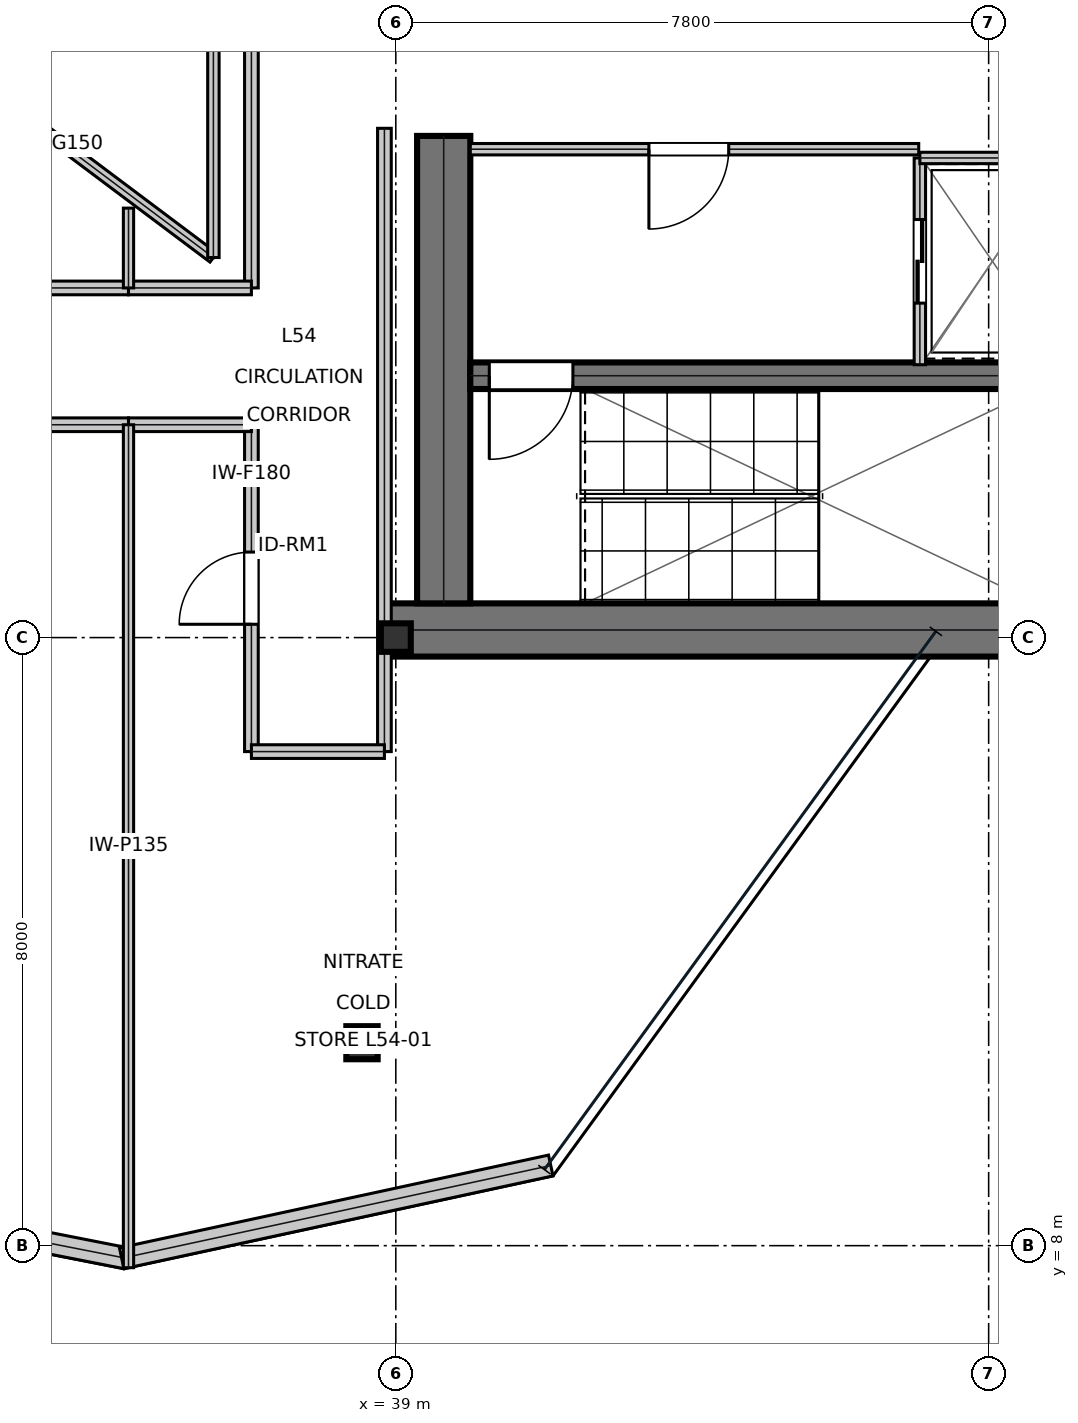
"""IFC4 building model, lengths in metres.
Left out: names, types, materials, properties, quantities, classifications, styles, units other than length and angle.
Written with IfcOpenShell. Run it as: python <this file> out.ifc"""

import sys

from ifc_helpers import new_model, si_unit, direction, frame, frame_2d, origin, origin_2d, place, context, subcontext, project, spatial, rectangle, i_section, extrude, element, fill, save


model = new_model("IFC4")
c1 = context("Model", 3, precision=1e-05, world=origin(), true_north=direction((0.0, 1.0)))
c2 = subcontext(c1, "Body", "Model", "MODEL_VIEW")
j1 = project(units=[si_unit("LENGTHUNIT", "METRE"), si_unit("PLANEANGLEUNIT", "RADIAN")], contexts=[c1])
p1 = place(None, origin())
s1 = spatial("IfcSite", under=j1, at=p1, CompositionType="ELEMENT")
p2 = place(p1, origin())
s2 = spatial("IfcBuilding", under=s1, at=p2, CompositionType="ELEMENT")
p3 = place(p2, frame((0.0, 0.0, 232.35)))
s3 = spatial("IfcBuildingStorey", under=s2, at=p3, CompositionType="ELEMENT", Elevation=232.35)
p4 = place(p3, frame((38.8, 16.1, 0.0), z_axis=(0.0, 0.0, 1.0), x_axis=(1.0, 0.0, 0.0)))
e1 = element("IfcWall", 1, at=p4, inside=s3, PredefinedType="SHEAR", context=c2, shape_type="SweptSolid", body=[
    extrude(rectangle(XDim=16.0, YDim=0.7, at=frame_2d((8.0, 0.0))), origin(), (0.0, 0.0, 1.0), 3.79),
])
p5 = place(p3, frame((39.63, 16.45, 0.0), z_axis=(0.0, 0.0, 1.0), x_axis=(0.0, 1.0, 0.0)))
e2 = element("IfcWall", 2, at=p5, inside=s3, PredefinedType="SHEAR", context=c2, shape_type="SweptSolid", body=[
    extrude(rectangle(XDim=6.15, YDim=0.7, at=frame_2d((3.075, 0.0))), origin(), (0.0, 0.0, 1.0), 3.79),
])
p6 = place(p3, frame((39.98, 19.445, 0.0), z_axis=(0.0, 0.0, 1.0), x_axis=(1.0, 0.0, 0.0)))
e3 = element("IfcWall", 3, at=p6, inside=s3, PredefinedType="SHEAR", context=c2, shape_type="SweptSolid", body=[
    extrude(rectangle(XDim=7.71, YDim=0.35, at=frame_2d((3.855, 0.0))), origin(), (0.0, 0.0, 1.0), 3.79),
])
p7 = place(p6, frame((0.25, 0.0, 0.0)))
e4 = element("IfcOpeningElement", 4, at=p7, cuts=e3, PredefinedType="OPENING", context=c2, shape_type="SweptSolid", body=[
    extrude(rectangle(XDim=1.1, YDim=2.15, at=frame_2d((0.55, 1.075))), frame((0.0, 0.185, 0.0), z_axis=(0.0, -1.0, 0.0), x_axis=(1.0, 0.0, 0.0)), (0.0, 0.0, 1.0), 0.37),
])
p8 = place(p3, frame((39.0, 16.0, 0.0), z_axis=(0.0, 0.0, 1.0), x_axis=(1.0, 0.0, 0.0)))
e5 = element("IfcColumn", 5, at=p8, inside=s3, PredefinedType="COLUMN", context=c2, shape_type="SweptSolid", body=[
    extrude(i_section(OverallWidth=0.394, OverallDepth=0.375, WebThickness=0.017, FlangeThickness=0.028, at=origin_2d()), origin(), (0.0, 0.0, 1.0), 4.044),
])
p9 = place(p3, frame((38.555, 10.67, 0.016), z_axis=(-0.00370544751, 0.022414920183, 0.999741887195), x_axis=(-0.986609855888, -0.163098106258, 0.0)))
e6 = element("IfcColumn", 6, at=p9, inside=s3, PredefinedType="COLUMN", context=c2, shape_type="SweptSolid", body=[
    extrude(i_section(OverallWidth=0.412, OverallDepth=0.435, WebThickness=0.036, FlangeThickness=0.058, at=origin_2d()), origin(), (0.0, 0.0, 1.0), 4.019),
])
p10 = place(p3, frame((29.804, 8.944, 0.0), z_axis=(0.0, 0.0, 1.0), x_axis=(0.981218426529, -0.192899972626, 0.0)))
e7 = element("IfcWall", 7, at=p10, inside=s3, PredefinedType="STANDARD", context=c2, shape_type="SweptSolid", body=[
    extrude(rectangle(XDim=5.754, YDim=0.28, at=frame_2d((2.877, 0.0))), origin(), (0.0, 0.0, 1.0), 3.79),
])
p11 = place(p3, frame((35.393, 7.834, 0.0), z_axis=(0.0, 0.0, 1.0), x_axis=(0.977403545606, 0.211381903286, 0.0)))
e8 = element("IfcWall", 8, at=p11, inside=s3, PredefinedType="STANDARD", context=c2, shape_type="SweptSolid", body=[
    extrude(rectangle(XDim=5.776, YDim=0.28, at=frame_2d((2.888, 0.0))), origin(), (0.0, 0.0, 1.0), 3.79),
])
p12 = place(p3, frame((39.98, 22.425, 0.0), z_axis=(0.0, 0.0, 1.0), x_axis=(1.0, 0.0, 0.0)))
e9 = element("IfcWall", 9, at=p12, inside=s3, PredefinedType="PARTITIONING", context=c2, shape_type="SweptSolid", body=[
    extrude(rectangle(XDim=5.9, YDim=0.15, at=frame_2d((2.95, 0.0))), origin(), (0.0, 0.0, 1.0), 3.79),
])
p13 = place(p12, frame((2.35, 0.0, 0.0)))
e10 = element("IfcOpeningElement", 10, at=p13, cuts=e9, PredefinedType="OPENING", context=c2, shape_type="SweptSolid", body=[
    extrude(rectangle(XDim=1.05, YDim=2.15, at=frame_2d((0.525, 1.075))), frame((0.0, 0.085, 0.0), z_axis=(0.0, -1.0, 0.0), x_axis=(1.0, 0.0, 0.0)), (0.0, 0.0, 1.0), 0.17),
])
p14 = place(p3, frame((45.895, 19.59, 0.0), z_axis=(0.0, 0.0, 1.0), x_axis=(0.0, 1.0, 0.0)))
e11 = element("IfcWall", 11, at=p14, inside=s3, PredefinedType="PARTITIONING", context=c2, shape_type="SweptSolid", body=[
    extrude(rectangle(XDim=2.72, YDim=0.15, at=frame_2d((1.36, 0.0))), origin(), (0.0, 0.0, 1.0), 3.79),
])
p15 = place(p14, frame((0.81, 0.0, 0.0)))
e12 = element("IfcOpeningElement", 12, at=p15, cuts=e11, PredefinedType="OPENING", context=c2, shape_type="SweptSolid", body=[
    extrude(rectangle(XDim=1.1, YDim=2.15, at=frame_2d((0.55, 1.075))), frame((0.0, 0.085, 0.0), z_axis=(0.0, -1.0, 0.0), x_axis=(1.0, 0.0, 0.0)), (0.0, 0.0, 1.0), 0.17),
])
p16 = place(p3, frame((45.895, 22.31, 0.0), z_axis=(0.0, 0.0, 1.0), x_axis=(1.0, 0.0, 0.0)))
e13 = element("IfcWall", 13, at=p16, inside=s3, PredefinedType="PARTITIONING", context=c2, shape_type="SweptSolid", body=[
    extrude(rectangle(XDim=1.915, YDim=0.15, at=frame_2d((0.958, 0.0))), origin(), (0.0, 0.0, 1.0), 3.79),
])
p17 = place(p3, frame((37.1, 14.5, 0.0), z_axis=(0.0, 0.0, 1.0), x_axis=(0.0, 1.0, 0.0)))
e14 = element("IfcWall", 14, at=p17, inside=s3, PredefinedType="SOLIDWALL", context=c2, shape_type="SweptSolid", body=[
    extrude(rectangle(XDim=4.3, YDim=0.18, at=frame_2d((2.15, 0.0))), origin(), (0.0, 0.0, 1.0), 3.241),
])
p18 = place(p17, frame((1.675, 0.0, 0.0)))
e15 = element("IfcOpeningElement", 15, at=p18, cuts=e14, PredefinedType="OPENING", context=c2, shape_type="SweptSolid", body=[
    extrude(rectangle(XDim=0.95, YDim=2.15, at=frame_2d((0.475, 1.075))), frame((0.0, 0.1, 0.0), z_axis=(0.0, -1.0, 0.0), x_axis=(1.0, 0.0, 0.0)), (0.0, 0.0, 1.0), 0.2),
])
p19 = place(p3, frame((26.418, 18.8, 0.0), z_axis=(0.0, 0.0, 1.0), x_axis=(1.0, 0.0, 0.0)))
e16 = element("IfcWall", 16, at=p19, inside=s3, PredefinedType="SOLIDWALL", context=c2, shape_type="SweptSolid", body=[
    extrude(rectangle(XDim=9.064, YDim=0.18, at=frame_2d((4.532, 0.0))), origin(), (0.0, 0.0, 1.0), 3.241),
])
p20 = place(p19, frame((4.057, 0.0, 0.0)))
e17 = element("IfcOpeningElement", 17, at=p20, cuts=e16, PredefinedType="OPENING", context=c2, shape_type="SweptSolid", body=[
    extrude(rectangle(XDim=0.95, YDim=2.15, at=frame_2d((0.475, 1.075))), frame((0.0, 0.1, 0.0), z_axis=(0.0, -1.0, 0.0), x_axis=(1.0, 0.0, 0.0)), (0.0, 0.0, 1.0), 0.2),
])
p21 = place(p3, frame((26.4, 20.6, 0.0), z_axis=(0.0, 0.0, 1.0), x_axis=(1.0, 0.0, 0.0)))
e18 = element("IfcWall", 18, at=p21, inside=s3, PredefinedType="SOLIDWALL", context=c2, shape_type="SweptSolid", body=[
    extrude(rectangle(XDim=9.083, YDim=0.18, at=frame_2d((4.542, 0.0))), origin(), (0.0, 0.0, 1.0), 3.241),
])
p22 = place(p21, frame((4.066, 0.0, 0.0)))
e19 = element("IfcOpeningElement", 19, at=p22, cuts=e18, PredefinedType="OPENING", context=c2, shape_type="SweptSolid", body=[
    extrude(rectangle(XDim=0.95, YDim=2.15, at=frame_2d((0.475, 1.075))), frame((0.0, 0.1, 0.0), z_axis=(0.0, -1.0, 0.0), x_axis=(1.0, 0.0, 0.0)), (0.0, 0.0, 1.0), 0.2),
])
p23 = place(p3, frame((37.1, 20.6, 0.0), z_axis=(0.0, 0.0, 1.0), x_axis=(0.0, 1.0, 0.0)))
e20 = element("IfcWall", 20, at=p23, inside=s3, PredefinedType="SOLIDWALL", context=c2, shape_type="SweptSolid", body=[
    extrude(rectangle(XDim=12.9, YDim=0.18, at=frame_2d((6.45, 0.0))), origin(), (0.0, 0.0, 1.0), 3.241),
])
p24 = place(p23, frame((7.415, 0.0, 0.0)))
e21 = element("IfcOpeningElement", 21, at=p24, cuts=e20, PredefinedType="OPENING", context=c2, shape_type="SweptSolid", body=[
    extrude(rectangle(XDim=0.95, YDim=2.15, at=frame_2d((0.475, 1.075))), frame((0.0, 0.1, 0.0), z_axis=(0.0, -1.0, 0.0), x_axis=(1.0, 0.0, 0.0)), (0.0, 0.0, 1.0), 0.2),
])
p25 = place(p3, frame((38.85, 14.5, 0.0), z_axis=(0.0, 0.0, 1.0), x_axis=(0.0, 1.0, 0.0)))
e22 = element("IfcWall", 22, at=p25, inside=s3, PredefinedType="SOLIDWALL", context=c2, shape_type="SweptSolid", body=[
    extrude(rectangle(XDim=8.2, YDim=0.18, at=frame_2d((4.1, 0.0))), origin(), (0.0, 0.0, 1.0), 3.241),
])
p26 = place(p3, frame((37.1, 14.5, 0.0), z_axis=(0.0, 0.0, 1.0), x_axis=(1.0, 0.0, 0.0)))
e23 = element("IfcWall", 23, at=p26, inside=s3, PredefinedType="SOLIDWALL", context=c2, shape_type="SweptSolid", body=[
    extrude(rectangle(XDim=1.75, YDim=0.18, at=frame_2d((0.875, 0.0))), origin(), (0.0, 0.0, 1.0), 3.241),
])
p27 = place(p3, frame((35.483, 18.8, 0.0), z_axis=(0.0, 0.0, 1.0), x_axis=(1.0, 0.0, 0.0)))
e24 = element("IfcWall", 24, at=p27, inside=s3, PredefinedType="SOLIDWALL", context=c2, shape_type="SweptSolid", body=[
    extrude(rectangle(XDim=1.617, YDim=0.18, at=frame_2d((0.809, 0.0))), origin(), (0.0, 0.0, 1.0), 3.79),
])
p28 = place(p3, frame((35.483, 20.6, 0.0), z_axis=(0.0, 0.0, 1.0), x_axis=(1.0, 0.0, 0.0)))
e25 = element("IfcWall", 25, at=p28, inside=s3, PredefinedType="SOLIDWALL", context=c2, shape_type="SweptSolid", body=[
    extrude(rectangle(XDim=1.617, YDim=0.18, at=frame_2d((0.809, 0.0))), origin(), (0.0, 0.0, 1.0), 3.468),
])
p29 = place(p3, frame((35.483, 7.71, 0.0), z_axis=(0.0, 0.0, 1.0), x_axis=(0.0, 1.0, 0.0)))
e26 = element("IfcWall", 26, at=p29, inside=s3, PredefinedType="PARTITIONING", context=c2, shape_type="SweptSolid", body=[
    extrude(rectangle(XDim=11.09, YDim=0.135, at=frame_2d((5.545, 0.0))), origin(), (0.0, 0.0, 1.0), 3.241),
])
p30 = place(p3, frame((35.483, 20.6, 0.0), z_axis=(0.0, 0.0, 1.0), x_axis=(0.0, 1.0, 0.0)))
e27 = element("IfcWall", 27, at=p30, inside=s3, PredefinedType="PARTITIONING", context=c2, shape_type="SweptSolid", body=[
    extrude(rectangle(XDim=1.05, YDim=0.135, at=frame_2d((0.525, 0.0))), origin(), (0.0, 0.0, 1.0), 3.79),
])
p31 = place(p3, frame((32.6, 24.0, 0.0), z_axis=(0.0, 0.0, 1.0), x_axis=(0.8, -0.6, 0.0)))
e28 = element("IfcWall", 28, at=p31, inside=s3, PredefinedType="MOVABLE", context=c2, shape_type="SweptSolid", body=[
    extrude(rectangle(XDim=5.0, YDim=0.15, at=frame_2d((2.5, 0.0))), origin(), (0.0, 0.0, 1.0), 3.79),
])
p32 = place(p3, frame((36.6, 21.0, 0.0), z_axis=(0.0, 0.0, 1.0), x_axis=(0.0, 1.0, 0.0)))
e29 = element("IfcWall", 29, at=p32, inside=s3, PredefinedType="MOVABLE", context=c2, shape_type="SweptSolid", body=[
    extrude(rectangle(XDim=6.0, YDim=0.15, at=frame_2d((3.0, 0.0))), origin(), (0.0, 0.0, 1.0), 3.79),
])
p33 = place(p13, frame((1.05, 0.0, 0.0), z_axis=(0.0, 0.0, 1.0), x_axis=(-1.0, 0.0, 0.0)))
e30 = element("IfcDoor", 30, at=p33, inside=s3, OperationType="SINGLE_SWING_RIGHT", PredefinedType="DOOR", context=c2, shape_type="SweptSolid", body=[
    extrude(rectangle(XDim=1.05, YDim=2.15, at=frame_2d((0.525, 1.075))), frame((0.0, 0.025, 0.0), z_axis=(0.0, -1.0, 0.0), x_axis=(1.0, 0.0, 0.0)), (0.0, 0.0, 1.0), 0.05),
])
fill(e10, e30)
p34 = place(p15, frame((1.1, 0.0, 0.0), z_axis=(0.0, 0.0, 1.0), x_axis=(-1.0, 0.0, 0.0)))
e31 = element("IfcDoor", 31, at=p34, inside=s3, OperationType="DOUBLE_DOOR_SLIDING", PredefinedType="DOOR", context=c2, shape_type="SweptSolid", body=[
    extrude(rectangle(XDim=1.1, YDim=2.15, at=frame_2d((0.55, 1.075))), frame((0.0, 0.025, 0.0), z_axis=(0.0, -1.0, 0.0), x_axis=(1.0, 0.0, 0.0)), (0.0, 0.0, 1.0), 0.05),
])
fill(e12, e31)
p35 = place(p18, origin())
e32 = element("IfcDoor", 32, at=p35, inside=s3, OperationType="SINGLE_SWING_LEFT", PredefinedType="DOOR", context=c2, shape_type="SweptSolid", body=[
    extrude(rectangle(XDim=0.95, YDim=2.15, at=frame_2d((0.475, 1.075))), frame((0.0, 0.025, 0.0), z_axis=(0.0, -1.0, 0.0), x_axis=(1.0, 0.0, 0.0)), (0.0, 0.0, 1.0), 0.05),
])
fill(e15, e32)
p36 = place(p7, frame((1.1, 0.0, 0.0), z_axis=(0.0, 0.0, 1.0), x_axis=(-1.0, 0.0, 0.0)))
e33 = element("IfcDoor", 33, at=p36, inside=s3, OperationType="SINGLE_SWING_RIGHT", PredefinedType="DOOR", context=c2, shape_type="SweptSolid", body=[
    extrude(rectangle(XDim=1.1, YDim=2.15, at=frame_2d((0.55, 1.075))), frame((0.0, 0.025, 0.0), z_axis=(0.0, -1.0, 0.0), x_axis=(1.0, 0.0, 0.0)), (0.0, 0.0, 1.0), 0.05),
])
fill(e4, e33)
save(model, sys.argv[1])
